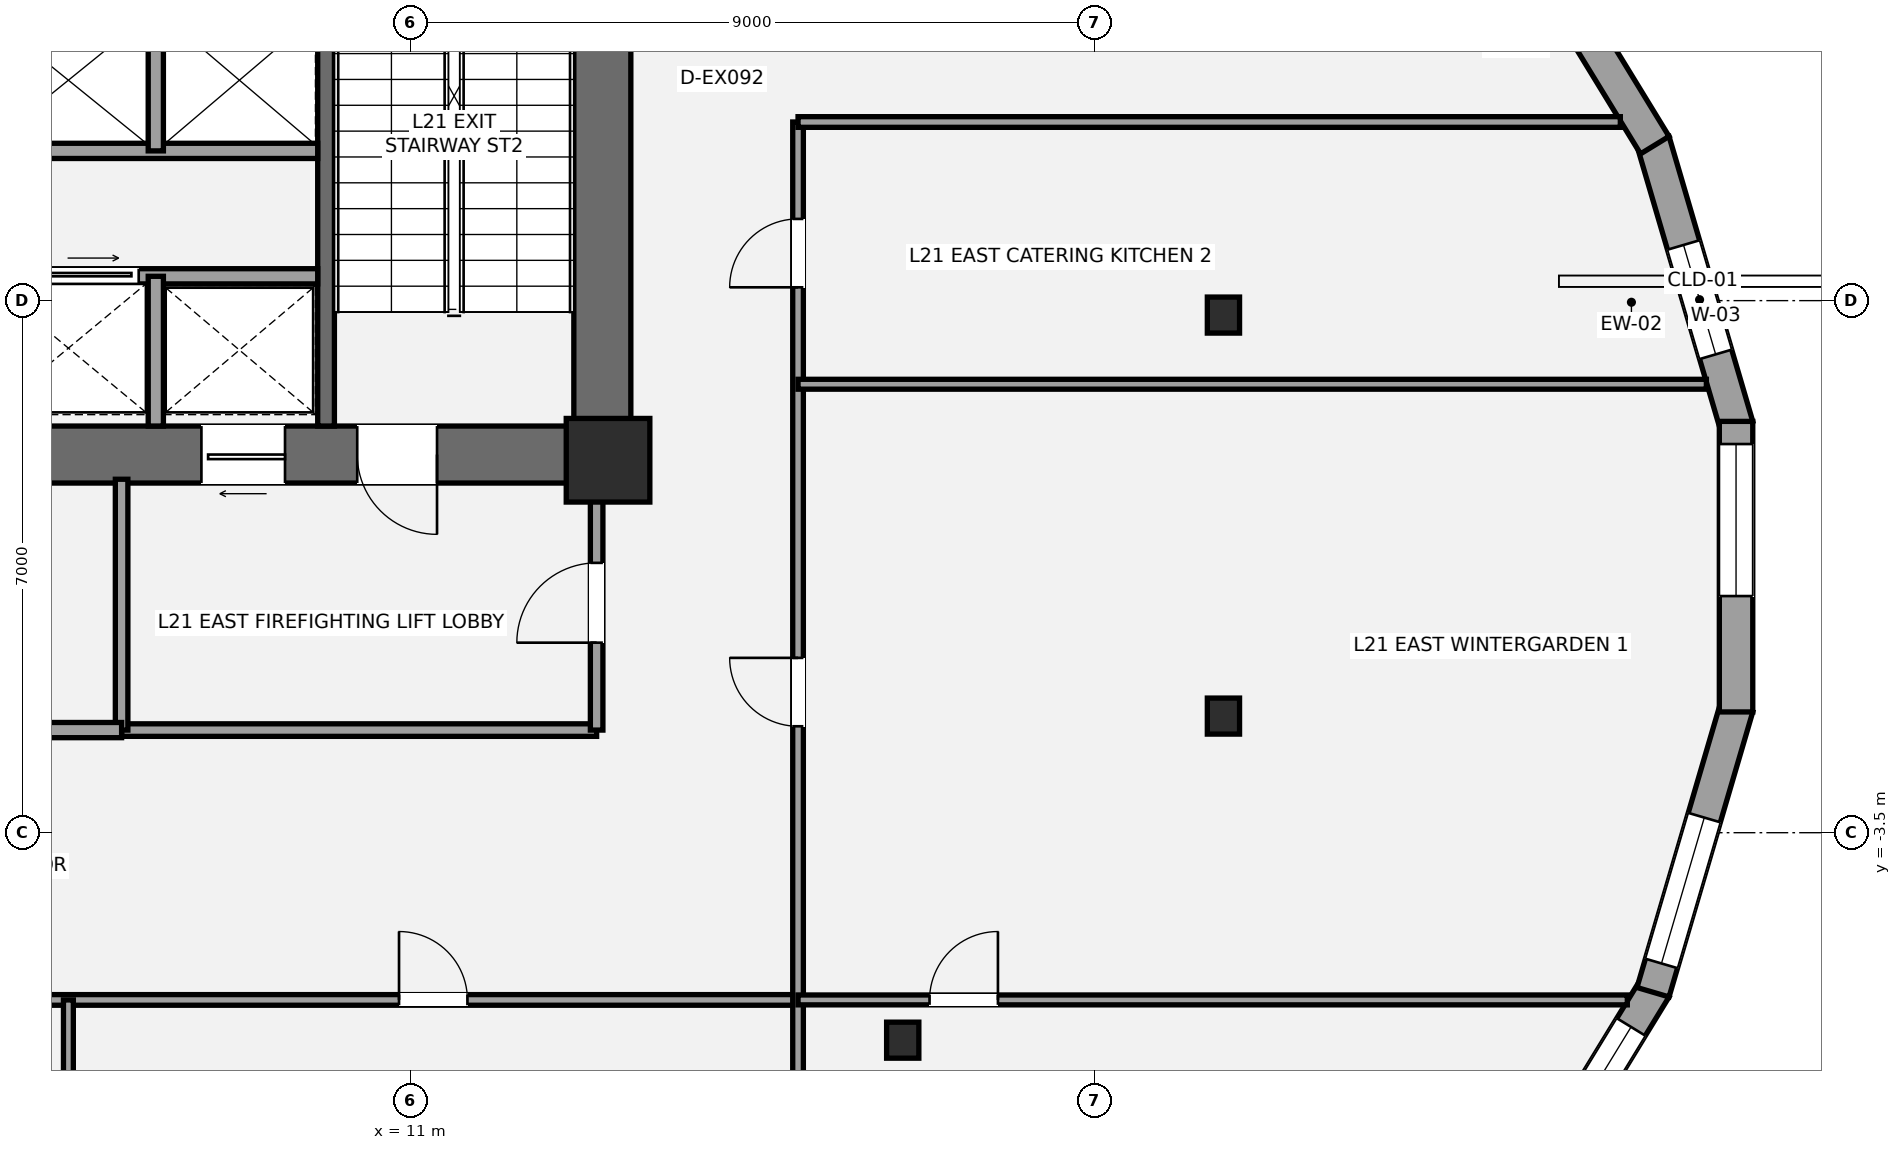
"""IFC4 building model, lengths in metres.
Left out: names, types, materials, properties, quantities, classifications, styles, units other than length and angle.
Written with IfcOpenShell. Run it as: python <this file> out.ifc"""

import sys

from ifc_helpers import new_model, si_unit, direction, frame, frame_2d, origin, origin_2d, place, context, subcontext, project, spatial, rectangle, i_section, extrude, element, fill, save


model = new_model("IFC4")
c1 = context("Model", 3, precision=1e-05, world=origin(), true_north=direction((0.0, 1.0)))
c2 = subcontext(c1, "Body", "Model", "MODEL_VIEW")
j1 = project(units=[si_unit("LENGTHUNIT", "METRE"), si_unit("PLANEANGLEUNIT", "RADIAN")], contexts=[c1])
p1 = place(None, origin())
s1 = spatial("IfcSite", under=j1, at=p1, CompositionType="ELEMENT")
p2 = place(p1, origin())
s2 = spatial("IfcBuilding", under=s1, at=p2, CompositionType="ELEMENT")
p3 = place(p2, frame((0.0, 0.0, 81.9)))
s3 = spatial("IfcBuildingStorey", under=s2, at=p3, CompositionType="ELEMENT", Elevation=81.9)
p4 = place(p3, frame((13.525, 1.1, 0.0), z_axis=(0.0, 0.0, 1.0), x_axis=(0.0, 1.0, 0.0)))
e1 = element("IfcWall", 1, at=p4, inside=s3, PredefinedType="SHEAR", context=c2, shape_type="SweptSolid", body=[
    extrude(rectangle(XDim=8.65, YDim=0.75, at=frame_2d((4.325, 0.0))), origin(), (0.0, 0.0, 1.0), 4.2),
])
p5 = place(p3, frame((13.9, 1.475, 0.0), z_axis=(0.0, 0.0, 1.0), x_axis=(-1.0, 0.0, 0.0)))
e2 = element("IfcWall", 2, at=p5, inside=s3, PredefinedType="SHEAR", context=c2, shape_type="SweptSolid", body=[
    extrude(rectangle(XDim=9.075, YDim=0.75, at=frame_2d((4.538, 0.0))), origin(), (0.0, 0.0, 1.0), 4.2),
])
p6 = place(p5, frame((2.55, 0.0, 0.0)))
e3 = element("IfcOpeningElement", 3, at=p6, cuts=e2, PredefinedType="OPENING", context=c2, shape_type="SweptSolid", body=[
    extrude(rectangle(XDim=1.05, YDim=2.15, at=frame_2d((0.525, 1.075))), frame((0.0, 0.385, 0.0), z_axis=(0.0, -1.0, 0.0), x_axis=(1.0, 0.0, 0.0)), (0.0, 0.0, 1.0), 0.77),
])
p7 = place(p5, frame((4.55, 0.0, 0.0)))
e4 = element("IfcOpeningElement", 4, at=p7, cuts=e2, PredefinedType="OPENING", context=c2, shape_type="SweptSolid", body=[
    extrude(rectangle(XDim=1.1, YDim=2.2, at=frame_2d((0.55, 1.1))), frame((0.0, 0.385, 0.0), z_axis=(0.0, -1.0, 0.0), x_axis=(1.0, 0.0, 0.0)), (0.0, 0.0, 1.0), 0.77),
])
p8 = place(p3, frame((9.89, 1.85, 0.0), z_axis=(0.0, 0.0, 1.0), x_axis=(0.0, 1.0, 0.0)))
e5 = element("IfcWall", 5, at=p8, inside=s3, PredefinedType="SHEAR", context=c2, shape_type="SweptSolid", body=[
    extrude(rectangle(XDim=7.15, YDim=0.22, at=frame_2d((3.575, 0.0))), origin(), (0.0, 0.0, 1.0), 4.2),
])
p9 = place(p3, frame((13.6, 1.4, 0.0), z_axis=(0.0, 0.0, 1.0), x_axis=(1.0, 0.0, 0.0)))
e6 = element("IfcColumn", 6, at=p9, inside=s3, PredefinedType="COLUMN", context=c2, shape_type="SweptSolid", body=[
    extrude(rectangle(XDim=1.1, YDim=1.1, at=origin_2d()), origin(), (0.0, 0.0, 1.0), 4.2),
])
for number, where, z_axis, x_axis in (
    (7, (21.697, 3.31, 0.0), (0.0, 0.0, 1.0), (1.0, 0.0, 0.0)),
    (8, (17.477, -6.229, 0.0), (0.0, 0.0, 1.0), (1.0, 0.0, 0.0)),
    (9, (21.697, -1.966, 0.0), (0.0, 0.0, 1.0), (1.0, 0.0, 0.0)),
):
    element("IfcColumn", number, at=place(p3, frame(where, z_axis=z_axis, x_axis=x_axis)), inside=s3, PredefinedType="COLUMN", context=c2, shape_type="SweptSolid", body=[
        extrude(i_section(OverallWidth=0.424, OverallDepth=0.474, WebThickness=0.048, FlangeThickness=0.077, at=origin_2d()), origin(), (0.0, 0.0, 1.0), 4.2),
    ])
p10 = place(p3, frame((27.349, 5.599, 0.0), z_axis=(0.0, 0.0, 1.0), x_axis=(0.281834819638, -0.959462940629, 0.0)))
e10 = element("IfcWall", 10, at=p10, inside=s3, PredefinedType="STANDARD", context=c2, shape_type="SweptSolid", body=[
    extrude(rectangle(XDim=3.908, YDim=0.44, at=frame_2d((1.954, 0.0))), origin(), (0.0, 0.0, 1.0), 3.228),
])
p11 = place(p10, frame((1.424, 0.0, 0.6)))
e11 = element("IfcOpeningElement", 11, at=p11, cuts=e10, PredefinedType="OPENING", context=c2, shape_type="SweptSolid", body=[
    extrude(rectangle(XDim=1.5, YDim=1.7, at=frame_2d((0.75, 0.85))), frame((0.0, 0.23, 0.0), z_axis=(0.0, -1.0, 0.0), x_axis=(1.0, 0.0, 0.0)), (0.0, 0.0, 1.0), 0.46),
])
p12 = place(p3, frame((25.212, 9.077, 0.0), z_axis=(0.0, 0.0, 1.0), x_axis=(0.521891226532, -0.85301204427, 0.0)))
e12 = element("IfcWall", 12, at=p12, inside=s3, PredefinedType="STANDARD", context=c2, shape_type="SweptSolid", body=[
    extrude(rectangle(XDim=4.14, YDim=0.44, at=frame_2d((2.07, 0.0))), origin(), (0.0, 0.0, 1.0), 3.228),
])
p13 = place(p12, frame((0.648, 0.0, 0.58)))
e13 = element("IfcOpeningElement", 13, at=p13, cuts=e12, PredefinedType="OPENING", context=c2, shape_type="SweptSolid", body=[
    extrude(rectangle(XDim=0.9, YDim=1.35, at=frame_2d((0.45, 0.675))), frame((0.0, 0.23, 0.0), z_axis=(0.0, -1.0, 0.0), x_axis=(1.0, 0.0, 0.0)), (0.0, 0.0, 1.0), 0.46),
])
p14 = place(p3, frame((27.372, -5.546, 0.0), z_axis=(0.0, 0.0, 1.0), x_axis=(-0.521891226532, -0.85301204427, 0.0)))
e14 = element("IfcWall", 14, at=p14, inside=s3, PredefinedType="STANDARD", context=c2, shape_type="SweptSolid", body=[
    extrude(rectangle(XDim=4.14, YDim=0.44, at=frame_2d((2.07, 0.0))), origin(), (0.0, 0.0, 1.0), 3.228),
])
p15 = place(p14, frame((0.598, 0.0, 0.6)))
e15 = element("IfcOpeningElement", 15, at=p15, cuts=e14, PredefinedType="OPENING", context=c2, shape_type="SweptSolid", body=[
    extrude(rectangle(XDim=2.0, YDim=2.1, at=frame_2d((1.0, 1.05))), frame((0.0, 0.23, 0.0), z_axis=(0.0, -1.0, 0.0), x_axis=(1.0, 0.0, 0.0)), (0.0, 0.0, 1.0), 0.46),
])
p16 = place(p3, frame((28.45, -1.849, 0.0), z_axis=(0.0, 0.0, 1.0), x_axis=(-0.281834819638, -0.959462940629, 0.0)))
e16 = element("IfcWall", 16, at=p16, inside=s3, PredefinedType="STANDARD", context=c2, shape_type="SweptSolid", body=[
    extrude(rectangle(XDim=3.908, YDim=0.44, at=frame_2d((1.954, 0.0))), origin(), (0.0, 0.0, 1.0), 3.228),
])
p17 = place(p16, frame((1.513, 0.0, 0.6)))
e17 = element("IfcOpeningElement", 17, at=p17, cuts=e16, PredefinedType="OPENING", context=c2, shape_type="SweptSolid", body=[
    extrude(rectangle(XDim=2.0, YDim=2.1, at=frame_2d((1.0, 1.05))), frame((0.0, 0.23, 0.0), z_axis=(0.0, -1.0, 0.0), x_axis=(1.0, 0.0, 0.0)), (0.0, 0.0, 1.0), 0.46),
])
p18 = place(p3, frame((28.441, 1.911, 0.0), z_axis=(0.0, 0.0, 1.0), x_axis=(0.0, -1.0, 0.0)))
e18 = element("IfcWall", 18, at=p18, inside=s3, PredefinedType="STANDARD", context=c2, shape_type="SweptSolid", body=[
    extrude(rectangle(XDim=3.823, YDim=0.44, at=frame_2d((1.911, 0.0))), origin(), (0.0, 0.0, 1.0), 3.232),
])
p19 = place(p18, frame((0.298, 0.0, 0.6)))
e19 = element("IfcOpeningElement", 19, at=p19, cuts=e18, PredefinedType="OPENING", context=c2, shape_type="SweptSolid", body=[
    extrude(rectangle(XDim=2.0, YDim=2.1, at=frame_2d((1.0, 1.05))), frame((0.0, 0.23, 0.0), z_axis=(0.0, -1.0, 0.0), x_axis=(1.0, 0.0, 0.0)), (0.0, 0.0, 1.0), 0.46),
])
p20 = place(p3, frame((7.2, -2.15, 0.0), z_axis=(0.0, 0.0, 1.0), x_axis=(1.0, 0.0, 0.0)))
e20 = element("IfcWall", 20, at=p20, inside=s3, PredefinedType="PARTITIONING", context=c2, shape_type="SweptSolid", body=[
    extrude(rectangle(XDim=6.25, YDim=0.165, at=frame_2d((3.125, 0.0))), origin(), (0.0, 0.0, 1.0), 4.01),
])
p21 = place(p3, frame((7.2, -2.15, 0.0), z_axis=(0.0, 0.0, 1.0), x_axis=(0.0, 1.0, 0.0)))
e21 = element("IfcWall", 21, at=p21, inside=s3, PredefinedType="PARTITIONING", context=c2, shape_type="SweptSolid", body=[
    extrude(rectangle(XDim=3.3, YDim=0.165, at=frame_2d((1.65, 0.0))), origin(), (0.0, 0.0, 1.0), 3.463),
])
p22 = place(p3, frame((13.45, -2.15, 0.0), z_axis=(0.0, 0.0, 1.0), x_axis=(0.0, 1.0, 0.0)))
e22 = element("IfcWall", 22, at=p22, inside=s3, PredefinedType="PARTITIONING", context=c2, shape_type="SweptSolid", body=[
    extrude(rectangle(XDim=3.3, YDim=0.165, at=frame_2d((1.65, 0.0))), origin(), (0.0, 0.0, 1.0), 3.463),
])
p23 = place(p22, frame((1.15, 0.0, 0.0)))
e23 = element("IfcOpeningElement", 23, at=p23, cuts=e22, PredefinedType="OPENING", context=c2, shape_type="SweptSolid", body=[
    extrude(rectangle(XDim=1.05, YDim=2.15, at=frame_2d((0.525, 1.075))), frame((0.0, 0.093, 0.0), z_axis=(0.0, -1.0, 0.0), x_axis=(1.0, 0.0, 0.0)), (0.0, 0.0, 1.0), 0.185),
])
p24 = place(p3, frame((4.95, -2.15, 0.0), z_axis=(0.0, 0.0, 1.0), x_axis=(1.0, 0.0, 0.0)))
e24 = element("IfcWall", 24, at=p24, inside=s3, PredefinedType="SOLIDWALL", context=c2, shape_type="SweptSolid", body=[
    extrude(rectangle(XDim=2.25, YDim=0.2, at=frame_2d((1.125, 0.0))), origin(), (0.0, 0.0, 1.0), 4.01),
])
p25 = place(p3, frame((5.575, 3.82, 0.0), z_axis=(0.0, 0.0, 1.0), x_axis=(1.0, 0.0, 0.0)))
e25 = element("IfcWall", 25, at=p25, inside=s3, PredefinedType="SOLIDWALL", context=c2, shape_type="SweptSolid", body=[
    extrude(rectangle(XDim=4.205, YDim=0.2, at=frame_2d((2.103, 0.0))), origin(), (0.0, 0.0, 1.0), 4.01),
])
p26 = place(p25, frame((0.65, 0.0, 0.0)))
e26 = element("IfcOpeningElement", 26, at=p26, cuts=e25, PredefinedType="OPENING", context=c2, shape_type="SweptSolid", body=[
    extrude(rectangle(XDim=1.2, YDim=2.2, at=frame_2d((0.6, 1.1))), frame((0.0, 0.11, 0.0), z_axis=(0.0, -1.0, 0.0), x_axis=(1.0, 0.0, 0.0)), (0.0, 0.0, 1.0), 0.22),
])
p27 = place(p3, frame((7.65, 1.85, 0.0), z_axis=(0.0, 0.0, 1.0), x_axis=(0.0, 1.0, 0.0)))
e27 = element("IfcWall", 27, at=p27, inside=s3, PredefinedType="SOLIDWALL", context=c2, shape_type="SweptSolid", body=[
    extrude(rectangle(XDim=1.97, YDim=0.2, at=frame_2d((0.985, 0.0))), origin(), (0.0, 0.0, 1.0), 4.01),
])
p28 = place(p3, frame((5.575, 5.47, 0.0), z_axis=(0.0, 0.0, 1.0), x_axis=(1.0, 0.0, 0.0)))
e28 = element("IfcWall", 28, at=p28, inside=s3, PredefinedType="SOLIDWALL", context=c2, shape_type="SweptSolid", body=[
    extrude(rectangle(XDim=4.205, YDim=0.2, at=frame_2d((2.103, 0.0))), origin(), (0.0, 0.0, 1.0), 4.01),
])
p29 = place(p3, frame((7.65, 5.47, 0.0), z_axis=(0.0, 0.0, 1.0), x_axis=(0.0, 1.0, 0.0)))
e29 = element("IfcWall", 29, at=p29, inside=s3, PredefinedType="SOLIDWALL", context=c2, shape_type="SweptSolid", body=[
    extrude(rectangle(XDim=1.86, YDim=0.2, at=frame_2d((0.93, 0.0))), origin(), (0.0, 0.0, 1.0), 4.01),
])
p30 = place(p3, frame((-16.1, -5.7, 0.0), z_axis=(0.0, 0.0, 1.0), x_axis=(1.0, 0.0, 0.0)))
e30 = element("IfcWall", 30, at=p30, inside=s3, PredefinedType="PARTITIONING", context=c2, shape_type="SweptSolid", body=[
    extrude(rectangle(XDim=32.2, YDim=0.14, at=frame_2d((16.1, 0.0))), origin(), (0.0, 0.0, 1.0), 3.463),
])
p31 = place(p30, frame((4.35, 0.0, 0.0)))
e31 = element("IfcOpeningElement", 31, at=p31, cuts=e30, PredefinedType="OPENING", context=c2, shape_type="SweptSolid", body=[
    extrude(rectangle(XDim=0.9, YDim=2.1, at=frame_2d((0.45, 1.05))), frame((0.0, 0.08, 0.0), z_axis=(0.0, -1.0, 0.0), x_axis=(1.0, 0.0, 0.0)), (0.0, 0.0, 1.0), 0.16),
])
p32 = place(p30, frame((15.65, 0.0, 0.0)))
e32 = element("IfcOpeningElement", 32, at=p32, cuts=e30, PredefinedType="OPENING", context=c2, shape_type="SweptSolid", body=[
    extrude(rectangle(XDim=0.9, YDim=2.1, at=frame_2d((0.45, 1.05))), frame((0.0, 0.08, 0.0), z_axis=(0.0, -1.0, 0.0), x_axis=(1.0, 0.0, 0.0)), (0.0, 0.0, 1.0), 0.16),
])
p33 = place(p30, frame((26.95, 0.0, 0.0)))
e33 = element("IfcOpeningElement", 33, at=p33, cuts=e30, PredefinedType="OPENING", context=c2, shape_type="SweptSolid", body=[
    extrude(rectangle(XDim=0.9, YDim=2.1, at=frame_2d((0.45, 1.05))), frame((0.0, 0.08, 0.0), z_axis=(0.0, -1.0, 0.0), x_axis=(1.0, 0.0, 0.0)), (0.0, 0.0, 1.0), 0.16),
])
p34 = place(p3, frame((16.1, -15.564, 0.0), z_axis=(0.0, 0.0, 1.0), x_axis=(0.0, 1.0, 0.0)))
e34 = element("IfcWall", 34, at=p34, inside=s3, PredefinedType="PARTITIONING", context=c2, shape_type="SweptSolid", body=[
    extrude(rectangle(XDim=21.414, YDim=0.14, at=frame_2d((10.707, 0.0))), origin(), (0.0, 0.0, 1.0), 3.451),
])
p35 = place(p34, frame((13.464, 0.0, 0.0)))
e35 = element("IfcOpeningElement", 35, at=p35, cuts=e34, PredefinedType="OPENING", context=c2, shape_type="SweptSolid", body=[
    extrude(rectangle(XDim=0.9, YDim=2.1, at=frame_2d((0.45, 1.05))), frame((0.0, 0.08, 0.0), z_axis=(0.0, -1.0, 0.0), x_axis=(1.0, 0.0, 0.0)), (0.0, 0.0, 1.0), 0.16),
])
p36 = place(p34, frame((19.239, 0.0, 0.0)))
e36 = element("IfcOpeningElement", 36, at=p36, cuts=e34, PredefinedType="OPENING", context=c2, shape_type="SweptSolid", body=[
    extrude(rectangle(XDim=0.9, YDim=2.1, at=frame_2d((0.45, 1.05))), frame((0.0, 0.08, 0.0), z_axis=(0.0, -1.0, 0.0), x_axis=(1.0, 0.0, 0.0)), (0.0, 0.0, 1.0), 0.16),
])
p37 = place(p3, frame((16.1, 5.85, 0.0), z_axis=(0.0, 0.0, 1.0), x_axis=(1.0, 0.0, 0.0)))
e37 = element("IfcWall", 37, at=p37, inside=s3, PredefinedType="PARTITIONING", context=c2, shape_type="SweptSolid", body=[
    extrude(rectangle(XDim=10.819, YDim=0.14, at=frame_2d((5.409, 0.0))), origin(), (0.0, 0.0, 1.0), 3.463),
])
p38 = place(p3, frame((6.5, -18.459, 0.0), z_axis=(0.0, 0.0, 1.0), x_axis=(0.0, 1.0, 0.0)))
e38 = element("IfcWall", 38, at=p38, inside=s3, PredefinedType="PARTITIONING", context=c2, shape_type="SweptSolid", body=[
    extrude(rectangle(XDim=12.759, YDim=0.13, at=frame_2d((6.379, 0.0))), origin(), (0.0, 0.0, 1.0), 3.451),
])
p39 = place(p3, frame((16.1, -5.7, 0.0), z_axis=(0.0, 0.0, 1.0), x_axis=(1.0, 0.0, 0.0)))
e39 = element("IfcWall", 39, at=p39, inside=s3, PredefinedType="PARTITIONING", context=c2, shape_type="SweptSolid", body=[
    extrude(rectangle(XDim=10.91, YDim=0.13, at=frame_2d((5.455, 0.0))), origin(), (0.0, 0.0, 1.0), 3.388),
])
p40 = place(p39, frame((1.73, 0.0, 0.0)))
e40 = element("IfcOpeningElement", 40, at=p40, cuts=e39, PredefinedType="OPENING", context=c2, shape_type="SweptSolid", body=[
    extrude(rectangle(XDim=0.9, YDim=2.1, at=frame_2d((0.45, 1.05))), frame((0.0, 0.075, 0.0), z_axis=(0.0, -1.0, 0.0), x_axis=(1.0, 0.0, 0.0)), (0.0, 0.0, 1.0), 0.15),
])
p41 = place(p3, frame((16.1, 2.4, 0.0), z_axis=(0.0, 0.0, 1.0), x_axis=(1.0, 0.0, 0.0)))
e41 = element("IfcWall", 41, at=p41, inside=s3, PredefinedType="PARTITIONING", context=c2, shape_type="SweptSolid", body=[
    extrude(rectangle(XDim=11.951, YDim=0.13, at=frame_2d((5.975, 0.0))), origin(), (0.0, 0.0, 1.0), 3.451),
])
p42 = place(p11, origin())
e42 = element("IfcWindow", 42, at=p42, inside=s3, PartitioningType="SINGLE_PANEL", PredefinedType="WINDOW", context=c2, shape_type="SweptSolid", body=[
    extrude(rectangle(XDim=1.5, YDim=1.7, at=frame_2d((0.75, 0.85))), frame((0.0, -0.01, 0.0), z_axis=(0.0, -1.0, 0.0), x_axis=(1.0, 0.0, 0.0)), (0.0, 0.0, 1.0), 0.06),
])
fill(e11, e42)
p43 = place(p15, origin())
e43 = element("IfcWindow", 43, at=p43, inside=s3, PartitioningType="SINGLE_PANEL", PredefinedType="WINDOW", context=c2, shape_type="SweptSolid", body=[
    extrude(rectangle(XDim=2.0, YDim=2.1, at=frame_2d((1.0, 1.05))), frame((0.0, -0.01, 0.0), z_axis=(0.0, -1.0, 0.0), x_axis=(1.0, 0.0, 0.0)), (0.0, 0.0, 1.0), 0.06),
])
fill(e15, e43)
p44 = place(p17, origin())
e44 = element("IfcWindow", 44, at=p44, inside=s3, PartitioningType="SINGLE_PANEL", PredefinedType="WINDOW", context=c2, shape_type="SweptSolid", body=[
    extrude(rectangle(XDim=2.0, YDim=2.1, at=frame_2d((1.0, 1.05))), frame((0.0, -0.01, 0.0), z_axis=(0.0, -1.0, 0.0), x_axis=(1.0, 0.0, 0.0)), (0.0, 0.0, 1.0), 0.06),
])
fill(e17, e44)
p45 = place(p19, origin())
e45 = element("IfcWindow", 45, at=p45, inside=s3, PartitioningType="SINGLE_PANEL", PredefinedType="WINDOW", context=c2, shape_type="SweptSolid", body=[
    extrude(rectangle(XDim=2.0, YDim=2.1, at=frame_2d((1.0, 1.05))), frame((0.0, -0.01, 0.0), z_axis=(0.0, -1.0, 0.0), x_axis=(1.0, 0.0, 0.0)), (0.0, 0.0, 1.0), 0.06),
])
fill(e19, e45)
p46 = place(p6, origin())
e46 = element("IfcDoor", 46, at=p46, inside=s3, OperationType="SINGLE_SWING_LEFT", PredefinedType="DOOR", context=c2, shape_type="SweptSolid", body=[
    extrude(rectangle(XDim=1.05, YDim=2.15, at=frame_2d((0.525, 1.075))), frame((0.0, 0.025, 0.0), z_axis=(0.0, -1.0, 0.0), x_axis=(1.0, 0.0, 0.0)), (0.0, 0.0, 1.0), 0.05),
])
fill(e3, e46)
p47 = place(p23, origin())
e47 = element("IfcDoor", 47, at=p47, inside=s3, OperationType="SINGLE_SWING_LEFT", PredefinedType="DOOR", context=c2, shape_type="SweptSolid", body=[
    extrude(rectangle(XDim=1.05, YDim=2.15, at=frame_2d((0.525, 1.075))), frame((0.0, 0.025, 0.0), z_axis=(0.0, -1.0, 0.0), x_axis=(1.0, 0.0, 0.0)), (0.0, 0.0, 1.0), 0.05),
])
fill(e23, e47)
p48 = place(p7, origin())
e48 = element("IfcDoor", 48, at=p48, inside=s3, OperationType="SLIDING_TO_LEFT", PredefinedType="DOOR", context=c2, shape_type="SweptSolid", body=[
    extrude(rectangle(XDim=1.1, YDim=2.2, at=frame_2d((0.55, 1.1))), frame((0.0, 0.025, 0.0), z_axis=(0.0, -1.0, 0.0), x_axis=(1.0, 0.0, 0.0)), (0.0, 0.0, 1.0), 0.05),
])
fill(e4, e48)
p49 = place(p26, origin())
e49 = element("IfcDoor", 49, at=p49, inside=s3, OperationType="SLIDING_TO_RIGHT", PredefinedType="DOOR", context=c2, shape_type="SweptSolid", body=[
    extrude(rectangle(XDim=1.2, YDim=2.2, at=frame_2d((0.6, 1.1))), frame((0.0, 0.025, 0.0), z_axis=(0.0, -1.0, 0.0), x_axis=(1.0, 0.0, 0.0)), (0.0, 0.0, 1.0), 0.05),
])
fill(e26, e49)
p50 = place(p33, origin())
e50 = element("IfcDoor", 50, at=p50, inside=s3, OperationType="SINGLE_SWING_LEFT", PredefinedType="DOOR", context=c2, shape_type="SweptSolid", body=[
    extrude(rectangle(XDim=0.9, YDim=2.1, at=frame_2d((0.45, 1.05))), frame((0.0, 0.025, 0.0), z_axis=(0.0, -1.0, 0.0), x_axis=(1.0, 0.0, 0.0)), (0.0, 0.0, 1.0), 0.05),
])
fill(e33, e50)
p51 = place(p40, origin())
e51 = element("IfcDoor", 51, at=p51, inside=s3, OperationType="SINGLE_SWING_RIGHT", PredefinedType="DOOR", context=c2, shape_type="SweptSolid", body=[
    extrude(rectangle(XDim=0.9, YDim=2.1, at=frame_2d((0.45, 1.05))), frame((0.0, 0.025, 0.0), z_axis=(0.0, -1.0, 0.0), x_axis=(1.0, 0.0, 0.0)), (0.0, 0.0, 1.0), 0.05),
])
fill(e40, e51)
p52 = place(p35, origin())
e52 = element("IfcDoor", 52, at=p52, inside=s3, OperationType="SINGLE_SWING_RIGHT", PredefinedType="DOOR", context=c2, shape_type="SweptSolid", body=[
    extrude(rectangle(XDim=0.9, YDim=2.1, at=frame_2d((0.45, 1.05))), frame((0.0, 0.025, 0.0), z_axis=(0.0, -1.0, 0.0), x_axis=(1.0, 0.0, 0.0)), (0.0, 0.0, 1.0), 0.05),
])
fill(e35, e52)
p53 = place(p36, origin())
e53 = element("IfcDoor", 53, at=p53, inside=s3, OperationType="SINGLE_SWING_LEFT", PredefinedType="DOOR", context=c2, shape_type="SweptSolid", body=[
    extrude(rectangle(XDim=0.9, YDim=2.1, at=frame_2d((0.45, 1.05))), frame((0.0, 0.025, 0.0), z_axis=(0.0, -1.0, 0.0), x_axis=(1.0, 0.0, 0.0)), (0.0, 0.0, 1.0), 0.05),
])
fill(e36, e53)
save(model, sys.argv[1])
